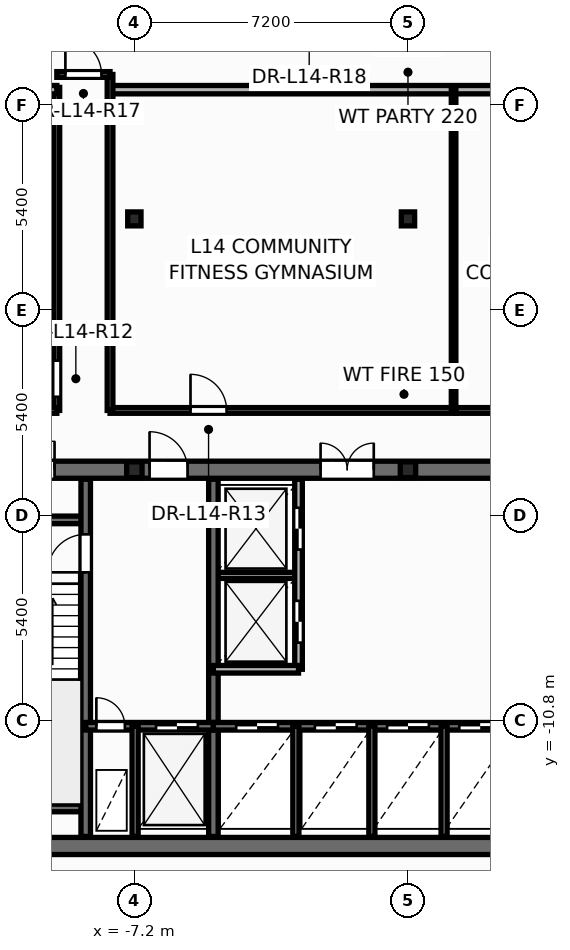
"""IFC4 building model, lengths in metres.
Left out: names, types, materials, properties, quantities, classifications, styles, units other than length and angle.
Written with IfcOpenShell. Run it as: python <this file> out.ifc"""

import sys

from ifc_helpers import new_model, si_unit, direction, frame, frame_2d, origin, origin_2d, place, context, subcontext, project, spatial, rectangle, i_section, extrude, element, fill, save


model = new_model("IFC4")
c1 = context("Model", 3, precision=1e-05, world=origin(), true_north=direction((0.0, 1.0)))
c2 = subcontext(c1, "Body", "Model", "MODEL_VIEW")
j1 = project(units=[si_unit("LENGTHUNIT", "METRE"), si_unit("PLANEANGLEUNIT", "RADIAN")], contexts=[c1])
p1 = place(None, origin())
s1 = spatial("IfcSite", under=j1, at=p1, CompositionType="ELEMENT")
p2 = place(p1, origin())
s2 = spatial("IfcBuilding", under=s1, at=p2, CompositionType="ELEMENT")
p3 = place(p2, frame((0.0, 0.0, 56.7)))
s3 = spatial("IfcBuildingStorey", under=s2, at=p3, CompositionType="ELEMENT", Elevation=56.7)
for number, where, z_axis, x_axis in (
    (1, (-7.2, -4.2, 0.0), (0.0, 0.0, 1.0), (1.0, 0.0, 0.0)),
    (2, (0.0, -4.2, 0.0), (0.0, 0.0, 1.0), (1.0, 0.0, 0.0)),
):
    element("IfcColumn", number, at=place(p3, frame(where, z_axis=z_axis, x_axis=x_axis)), inside=s3, PredefinedType="PILASTER", context=c2, shape_type="SweptSolid", body=[
        extrude(i_section(OverallWidth=0.405, OverallDepth=0.414, WebThickness=0.022, FlangeThickness=0.032, at=origin_2d()), origin(), (0.0, 0.0, 1.0), 3.6),
    ])
for number, where, z_axis, x_axis in (
    (3, (-7.2, 2.4, 0.0), (0.0, 0.0, 1.0), (1.0, 0.0, 0.0)),
    (4, (0.0, 2.4, 0.0), (0.0, 0.0, 1.0), (1.0, 0.0, 0.0)),
):
    element("IfcColumn", number, at=place(p3, frame(where, z_axis=z_axis, x_axis=x_axis)), inside=s3, PredefinedType="COLUMN", context=c2, shape_type="SweptSolid", body=[
        extrude(i_section(OverallWidth=0.35, OverallDepth=0.367, WebThickness=0.025, FlangeThickness=0.032, at=origin_2d()), origin(), (0.0, 0.0, 1.0), 3.6),
    ])
p4 = place(p3, frame((-5.12, -6.98, 0.0), z_axis=(0.0, 0.0, 1.0), x_axis=(1.0, 0.0, 0.0)))
e5 = element("IfcWall", 5, at=p4, inside=s3, PredefinedType="PARTITIONING", context=c2, shape_type="SweptSolid", body=[
    extrude(rectangle(XDim=2.24, YDim=0.16, at=frame_2d((1.12, 0.0))), origin(), (0.0, 0.0, 1.0), 3.32),
])
p5 = place(p3, frame((-12.65, -14.1, 0.0), z_axis=(0.0, 0.0, 1.0), x_axis=(1.0, 0.0, 0.0)))
e6 = element("IfcWall", 6, at=p5, inside=s3, PredefinedType="SHEAR", context=c2, shape_type="SweptSolid", body=[
    extrude(rectangle(XDim=25.3, YDim=0.45, at=frame_2d((12.65, 0.0))), origin(), (0.0, 0.0, 1.0), 3.6),
])
p6 = place(p3, frame((-12.65, -4.2, 0.0), z_axis=(0.0, 0.0, 1.0), x_axis=(1.0, 0.0, 0.0)))
e7 = element("IfcWall", 7, at=p6, inside=s3, PredefinedType="SHEAR", context=c2, shape_type="SweptSolid", body=[
    extrude(rectangle(XDim=25.3, YDim=0.45, at=frame_2d((12.65, 0.0))), origin(), (0.0, 0.0, 1.0), 3.6),
])
p7 = place(p6, frame((0.95, 0.0, 0.0)))
e8 = element("IfcOpeningElement", 8, at=p7, cuts=e7, PredefinedType="OPENING", context=c2, shape_type="SweptSolid", body=[
    extrude(rectangle(XDim=0.756, YDim=2.054, at=frame_2d((0.375, 1.027))), frame((0.0, 0.235, 0.0), z_axis=(0.0, -1.0, 0.0), x_axis=(1.0, 0.0, 0.0)), (0.0, 0.0, 1.0), 0.47),
])
p8 = place(p6, frame((2.6, 0.0, 0.0)))
e9 = element("IfcOpeningElement", 9, at=p8, cuts=e7, PredefinedType="OPENING", context=c2, shape_type="SweptSolid", body=[
    extrude(rectangle(XDim=0.756, YDim=2.054, at=frame_2d((0.375, 1.027))), frame((0.0, 0.235, 0.0), z_axis=(0.0, -1.0, 0.0), x_axis=(1.0, 0.0, 0.0)), (0.0, 0.0, 1.0), 0.47),
])
p9 = place(p6, frame((21.85, 0.0, 0.0)))
e10 = element("IfcOpeningElement", 10, at=p9, cuts=e7, PredefinedType="OPENING", context=c2, shape_type="SweptSolid", body=[
    extrude(rectangle(XDim=0.756, YDim=2.054, at=frame_2d((0.375, 1.027))), frame((0.0, 0.235, 0.0), z_axis=(0.0, -1.0, 0.0), x_axis=(1.0, 0.0, 0.0)), (0.0, 0.0, 1.0), 0.47),
])
p10 = place(p6, frame((23.5, 0.0, 0.0)))
e11 = element("IfcOpeningElement", 11, at=p10, cuts=e7, PredefinedType="OPENING", context=c2, shape_type="SweptSolid", body=[
    extrude(rectangle(XDim=0.756, YDim=2.054, at=frame_2d((0.375, 1.027))), frame((0.0, 0.235, 0.0), z_axis=(0.0, -1.0, 0.0), x_axis=(1.0, 0.0, 0.0)), (0.0, 0.0, 1.0), 0.47),
])
p11 = place(p6, frame((5.85, 0.0, 0.0)))
e12 = element("IfcOpeningElement", 12, at=p11, cuts=e7, PredefinedType="OPENING", context=c2, shape_type="SweptSolid", body=[
    extrude(rectangle(XDim=1.006, YDim=2.104, at=frame_2d((0.5, 1.052))), frame((0.0, 0.235, 0.0), z_axis=(0.0, -1.0, 0.0), x_axis=(1.0, 0.0, 0.0)), (0.0, 0.0, 1.0), 0.47),
])
p12 = place(p6, frame((10.35, 0.0, 0.0)))
e13 = element("IfcOpeningElement", 13, at=p12, cuts=e7, PredefinedType="OPENING", context=c2, shape_type="SweptSolid", body=[
    extrude(rectangle(XDim=1.406, YDim=2.154, at=frame_2d((0.7, 1.077))), frame((0.0, 0.235, 0.0), z_axis=(0.0, -1.0, 0.0), x_axis=(1.0, 0.0, 0.0)), (0.0, 0.0, 1.0), 0.47),
])
p13 = place(p6, frame((18.45, 0.0, 0.0)))
e14 = element("IfcOpeningElement", 14, at=p13, cuts=e7, PredefinedType="OPENING", context=c2, shape_type="SweptSolid", body=[
    extrude(rectangle(XDim=1.006, YDim=2.104, at=frame_2d((0.5, 1.052))), frame((0.0, 0.235, 0.0), z_axis=(0.0, -1.0, 0.0), x_axis=(1.0, 0.0, 0.0)), (0.0, 0.0, 1.0), 0.47),
])
for number, where, z_axis, x_axis in (
    (15, (-12.35, -5.52, 0.0), (0.0, 0.0, 1.0), (1.0, 0.0, 0.0)),
    (16, (-12.35, -13.1, 0.0), (0.0, 0.0, 1.0), (1.0, 0.0, 0.0)),
):
    element("IfcWall", number, at=place(p3, frame(where, z_axis=z_axis, x_axis=x_axis)), inside=s3, PredefinedType="SOLIDWALL", context=c2, shape_type="SweptSolid", body=[
        extrude(rectangle(XDim=3.87, YDim=0.2, at=frame_2d((1.935, 0.0))), origin(), (0.0, 0.0, 1.0), 3.6),
    ])
p14 = place(p3, frame((-8.48, -13.85, 0.0), z_axis=(0.0, 0.0, 1.0), x_axis=(0.0, 1.0, 0.0)))
e17 = element("IfcWall", 17, at=p14, inside=s3, PredefinedType="SHEAR", context=c2, shape_type="SweptSolid", body=[
    extrude(rectangle(XDim=9.4, YDim=0.25, at=frame_2d((4.7, 0.0))), origin(), (0.0, 0.0, 1.0), 3.6),
])
p15 = place(p14, frame((6.95, 0.0, 0.0)))
e18 = element("IfcOpeningElement", 18, at=p15, cuts=e17, PredefinedType="OPENING", context=c2, shape_type="SweptSolid", body=[
    extrude(rectangle(XDim=1.006, YDim=2.104, at=frame_2d((0.5, 1.052))), frame((0.0, 0.135, 0.0), z_axis=(0.0, -1.0, 0.0), x_axis=(1.0, 0.0, 0.0)), (0.0, 0.0, 1.0), 0.27),
])
p16 = place(p3, frame((-5.12, -13.85, 0.0), z_axis=(0.0, 0.0, 1.0), x_axis=(0.0, 1.0, 0.0)))
e19 = element("IfcWall", 19, at=p16, inside=s3, PredefinedType="SHEAR", context=c2, shape_type="SweptSolid", body=[
    extrude(rectangle(XDim=9.4, YDim=0.25, at=frame_2d((4.7, 0.0))), origin(), (0.0, 0.0, 1.0), 3.6),
])
p17 = place(p3, frame((-8.48, -10.95, 0.0), z_axis=(0.0, 0.0, 1.0), x_axis=(1.0, 0.0, 0.0)))
e20 = element("IfcWall", 20, at=p17, inside=s3, PredefinedType="SOLIDWALL", context=c2, shape_type="SweptSolid", body=[
    extrude(rectangle(XDim=3.36, YDim=0.2, at=frame_2d((1.68, 0.0))), origin(), (0.0, 0.0, 1.0), 3.6),
])
p18 = place(p17, frame((0.28, 0.0, 0.0)))
e21 = element("IfcOpeningElement", 21, at=p18, cuts=e20, PredefinedType="OPENING", context=c2, shape_type="SweptSolid", body=[
    extrude(rectangle(XDim=0.756, YDim=2.054, at=frame_2d((0.375, 1.027))), frame((0.0, 0.11, 0.0), z_axis=(0.0, -1.0, 0.0), x_axis=(1.0, 0.0, 0.0)), (0.0, 0.0, 1.0), 0.22),
])
p19 = place(p17, frame((1.85, 0.0, 0.0)))
e22 = element("IfcOpeningElement", 22, at=p19, cuts=e20, PredefinedType="OPENING", context=c2, shape_type="SweptSolid", body=[
    extrude(rectangle(XDim=1.106, YDim=2.104, at=frame_2d((0.55, 1.052))), frame((0.0, 0.11, 0.0), z_axis=(0.0, -1.0, 0.0), x_axis=(1.0, 0.0, 0.0)), (0.0, 0.0, 1.0), 0.22),
])
p20 = place(p3, frame((-5.12, -10.95, 0.0), z_axis=(0.0, 0.0, 1.0), x_axis=(1.0, 0.0, 0.0)))
e23 = element("IfcWall", 23, at=p20, inside=s3, PredefinedType="SOLIDWALL", context=c2, shape_type="SweptSolid", body=[
    extrude(rectangle(XDim=10.24, YDim=0.2, at=frame_2d((5.12, 0.0))), origin(), (0.0, 0.0, 1.0), 3.6),
])
p21 = place(p20, frame((0.6, 0.0, 0.0)))
e24 = element("IfcOpeningElement", 24, at=p21, cuts=e23, PredefinedType="OPENING", context=c2, shape_type="SweptSolid", body=[
    extrude(rectangle(XDim=1.106, YDim=2.104, at=frame_2d((0.55, 1.052))), frame((0.0, 0.11, 0.0), z_axis=(0.0, -1.0, 0.0), x_axis=(1.0, 0.0, 0.0)), (0.0, 0.0, 1.0), 0.22),
])
p22 = place(p20, frame((2.67, 0.0, 0.0)))
e25 = element("IfcOpeningElement", 25, at=p22, cuts=e23, PredefinedType="OPENING", context=c2, shape_type="SweptSolid", body=[
    extrude(rectangle(XDim=1.106, YDim=2.104, at=frame_2d((0.55, 1.052))), frame((0.0, 0.11, 0.0), z_axis=(0.0, -1.0, 0.0), x_axis=(1.0, 0.0, 0.0)), (0.0, 0.0, 1.0), 0.22),
])
p23 = place(p20, frame((4.57, 0.0, 0.0)))
e26 = element("IfcOpeningElement", 26, at=p23, cuts=e23, PredefinedType="OPENING", context=c2, shape_type="SweptSolid", body=[
    extrude(rectangle(XDim=1.106, YDim=2.104, at=frame_2d((0.55, 1.052))), frame((0.0, 0.11, 0.0), z_axis=(0.0, -1.0, 0.0), x_axis=(1.0, 0.0, 0.0)), (0.0, 0.0, 1.0), 0.22),
])
p24 = place(p20, frame((6.47, 0.0, 0.0)))
e27 = element("IfcOpeningElement", 27, at=p24, cuts=e23, PredefinedType="OPENING", context=c2, shape_type="SweptSolid", body=[
    extrude(rectangle(XDim=1.106, YDim=2.104, at=frame_2d((0.55, 1.052))), frame((0.0, 0.11, 0.0), z_axis=(0.0, -1.0, 0.0), x_axis=(1.0, 0.0, 0.0)), (0.0, 0.0, 1.0), 0.22),
])
p25 = place(p20, frame((8.54, 0.0, 0.0)))
e28 = element("IfcOpeningElement", 28, at=p25, cuts=e23, PredefinedType="OPENING", context=c2, shape_type="SweptSolid", body=[
    extrude(rectangle(XDim=1.106, YDim=2.104, at=frame_2d((0.55, 1.052))), frame((0.0, 0.11, 0.0), z_axis=(0.0, -1.0, 0.0), x_axis=(1.0, 0.0, 0.0)), (0.0, 0.0, 1.0), 0.22),
])
for number, where, z_axis, x_axis in (
    (29, (-7.18, -13.85, 0.0), (0.0, 0.0, 1.0), (0.0, 1.0, 0.0)),
    (30, (-2.95, -13.85, 0.0), (0.0, 0.0, 1.0), (0.0, 1.0, 0.0)),
):
    element("IfcWall", number, at=place(p3, frame(where, z_axis=z_axis, x_axis=x_axis)), inside=s3, PredefinedType="PARTITIONING", context=c2, shape_type="SweptSolid", body=[
        extrude(rectangle(XDim=2.9, YDim=0.16, at=frame_2d((1.45, 0.0))), origin(), (0.0, 0.0, 1.0), 2.345),
    ])
p26 = place(p3, frame((-2.88, -9.45, 0.0), z_axis=(0.0, 0.0, 1.0), x_axis=(0.0, 1.0, 0.0)))
e31 = element("IfcWall", 31, at=p26, inside=s3, PredefinedType="SOLIDWALL", context=c2, shape_type="SweptSolid", body=[
    extrude(rectangle(XDim=5.0, YDim=0.2, at=frame_2d((2.5, 0.0))), origin(), (0.0, 0.0, 1.0), 3.32),
])
p27 = place(p26, frame((0.7, 0.0, 0.0)))
e32 = element("IfcOpeningElement", 32, at=p27, cuts=e31, PredefinedType="OPENING", context=c2, shape_type="SweptSolid", body=[
    extrude(rectangle(XDim=1.106, YDim=2.104, at=frame_2d((0.55, 1.052))), frame((0.0, 0.11, 0.0), z_axis=(0.0, -1.0, 0.0), x_axis=(1.0, 0.0, 0.0)), (0.0, 0.0, 1.0), 0.22),
])
p28 = place(p26, frame((3.15, 0.0, 0.0)))
e33 = element("IfcOpeningElement", 33, at=p28, cuts=e31, PredefinedType="OPENING", context=c2, shape_type="SweptSolid", body=[
    extrude(rectangle(XDim=1.106, YDim=2.104, at=frame_2d((0.55, 1.052))), frame((0.0, 0.11, 0.0), z_axis=(0.0, -1.0, 0.0), x_axis=(1.0, 0.0, 0.0)), (0.0, 0.0, 1.0), 0.22),
])
p29 = place(p3, frame((-5.12, -9.45, 0.0), z_axis=(0.0, 0.0, 1.0), x_axis=(1.0, 0.0, 0.0)))
e34 = element("IfcWall", 34, at=p29, inside=s3, PredefinedType="SOLIDWALL", context=c2, shape_type="SweptSolid", body=[
    extrude(rectangle(XDim=2.24, YDim=0.2, at=frame_2d((1.12, 0.0))), origin(), (0.0, 0.0, 1.0), 3.32),
])
for number, where, z_axis, x_axis in (
    (35, (-0.95, -13.85, 0.0), (0.0, 0.0, 1.0), (0.0, 1.0, 0.0)),
    (36, (0.95, -13.85, 0.0), (0.0, 0.0, 1.0), (0.0, 1.0, 0.0)),
):
    element("IfcWall", number, at=place(p3, frame(where, z_axis=z_axis, x_axis=x_axis)), inside=s3, PredefinedType="PARTITIONING", context=c2, shape_type="SweptSolid", body=[
        extrude(rectangle(XDim=2.9, YDim=0.16, at=frame_2d((1.45, 0.0))), origin(), (0.0, 0.0, 1.0), 2.345),
    ])
p30 = place(p3, frame((-7.84, -2.64, 0.0), z_axis=(0.0, 0.0, 1.0), x_axis=(1.0, 0.0, 0.0)))
e37 = element("IfcWall", 37, at=p30, inside=s3, PredefinedType="PARTITIONING", context=c2, shape_type="SweptSolid", body=[
    extrude(rectangle(XDim=9.1, YDim=0.15, at=frame_2d((4.55, 0.0))), origin(), (0.0, 0.0, 1.0), 2.295),
])
p31 = place(p30, frame((2.117, 0.0, 0.0)))
e38 = element("IfcOpeningElement", 38, at=p31, cuts=e37, PredefinedType="OPENING", context=c2, shape_type="SweptSolid", body=[
    extrude(rectangle(XDim=0.956, YDim=2.104, at=frame_2d((0.475, 1.052))), frame((0.0, 0.085, 0.0), z_axis=(0.0, -1.0, 0.0), x_axis=(1.0, 0.0, 0.0)), (0.0, 0.0, 1.0), 0.17),
])
p32 = place(p3, frame((-7.84, 5.8, 0.0), z_axis=(0.0, 0.0, 1.0), x_axis=(1.0, 0.0, 0.0)))
e39 = element("IfcWall", 39, at=p32, inside=s3, PredefinedType="PARTITIONING", context=c2, shape_type="SweptSolid", body=[
    extrude(rectangle(XDim=15.68, YDim=0.22, at=frame_2d((7.84, 0.0))), origin(), (0.0, 0.0, 1.0), 2.295),
])
p33 = place(p3, frame((-9.24, -2.64, 0.0), z_axis=(0.0, 0.0, 1.0), x_axis=(0.0, 1.0, 0.0)))
e40 = element("IfcWall", 40, at=p33, inside=s3, PredefinedType="PARTITIONING", context=c2, shape_type="SweptSolid", body=[
    extrude(rectangle(XDim=8.5, YDim=0.15, at=frame_2d((4.25, 0.0))), origin(), (0.0, 0.0, 1.0), 2.479),
])
p34 = place(p33, frame((0.36, 0.0, 0.0)))
e41 = element("IfcOpeningElement", 41, at=p34, cuts=e40, PredefinedType="OPENING", context=c2, shape_type="SweptSolid", body=[
    extrude(rectangle(XDim=0.956, YDim=2.104, at=frame_2d((0.475, 1.052))), frame((0.0, 0.085, 0.0), z_axis=(0.0, -1.0, 0.0), x_axis=(1.0, 0.0, 0.0)), (0.0, 0.0, 1.0), 0.17),
])
p35 = place(p3, frame((-7.84, -2.64, 0.0), z_axis=(0.0, 0.0, 1.0), x_axis=(0.0, 1.0, 0.0)))
e42 = element("IfcWall", 42, at=p35, inside=s3, PredefinedType="PARTITIONING", context=c2, shape_type="SweptSolid", body=[
    extrude(rectangle(XDim=8.84, YDim=0.15, at=frame_2d((4.42, 0.0))), origin(), (0.0, 0.0, 1.0), 2.479),
])
p36 = place(p3, frame((1.2, -2.64, 0.0), z_axis=(0.0, 0.0, 1.0), x_axis=(0.0, 1.0, 0.0)))
e43 = element("IfcWall", 43, at=p36, inside=s3, PredefinedType="PARTITIONING", context=c2, shape_type="SweptSolid", body=[
    extrude(rectangle(XDim=8.44, YDim=0.12, at=frame_2d((4.22, 0.0))), origin(), (0.0, 0.0, 1.0), 2.295),
])
p37 = place(p3, frame((1.262, -2.64, 0.0), z_axis=(0.0, 0.0, 1.0), x_axis=(1.0, 0.0, 0.0)))
e44 = element("IfcWall", 44, at=p37, inside=s3, PredefinedType="PARTITIONING", context=c2, shape_type="SweptSolid", body=[
    extrude(rectangle(XDim=6.578, YDim=0.15, at=frame_2d((3.289, 0.0))), origin(), (0.0, 0.0, 1.0), 2.295),
])
p38 = place(p3, frame((-12.5, -2.64, 0.0), z_axis=(0.0, 0.0, 1.0), x_axis=(1.0, 0.0, 0.0)))
e45 = element("IfcWall", 45, at=p38, inside=s3, PredefinedType="PARTITIONING", context=c2, shape_type="SweptSolid", body=[
    extrude(rectangle(XDim=3.26, YDim=0.15, at=frame_2d((1.63, 0.0))), origin(), (0.0, 0.0, 1.0), 3.32),
])
p39 = place(p3, frame((-12.781, 5.8, 0.0), z_axis=(0.0, 0.0, 1.0), x_axis=(1.0, 0.0, 0.0)))
e46 = element("IfcWall", 46, at=p39, inside=s3, PredefinedType="PARTITIONING", context=c2, shape_type="SweptSolid", body=[
    extrude(rectangle(XDim=3.542, YDim=0.22, at=frame_2d((1.771, 0.0))), origin(), (0.0, 0.0, 1.0), 2.479),
])
p40 = place(p3, frame((-9.24, 6.2, 0.0), z_axis=(0.0, 0.0, 1.0), x_axis=(1.0, 0.0, 0.0)))
e47 = element("IfcWall", 47, at=p40, inside=s3, PredefinedType="PARTITIONING", context=c2, shape_type="SweptSolid", body=[
    extrude(rectangle(XDim=1.4, YDim=0.15, at=frame_2d((0.7, 0.0))), origin(), (0.0, 0.0, 1.0), 3.32),
])
p41 = place(p40, frame((0.225, 0.0, 0.0)))
e48 = element("IfcOpeningElement", 48, at=p41, cuts=e47, PredefinedType="OPENING", context=c2, shape_type="SweptSolid", body=[
    extrude(rectangle(XDim=0.956, YDim=2.104, at=frame_2d((0.475, 1.052))), frame((0.0, 0.085, 0.0), z_axis=(0.0, -1.0, 0.0), x_axis=(1.0, 0.0, 0.0)), (0.0, 0.0, 1.0), 0.17),
])
p42 = place(p27, origin())
e49 = element("IfcDoor", 49, at=p42, inside=s3, OperationType="DOUBLE_DOOR_SLIDING", PredefinedType="DOOR", context=c2, shape_type="SweptSolid", body=[
    extrude(rectangle(XDim=1.1, YDim=2.1, at=frame_2d((0.55, 1.05))), frame((0.0, 0.025, 0.0), z_axis=(0.0, -1.0, 0.0), x_axis=(1.0, 0.0, 0.0)), (0.0, 0.0, 1.0), 0.05),
])
fill(e32, e49)
p43 = place(p28, origin())
e50 = element("IfcDoor", 50, at=p43, inside=s3, OperationType="DOUBLE_DOOR_SLIDING", PredefinedType="DOOR", context=c2, shape_type="SweptSolid", body=[
    extrude(rectangle(XDim=1.1, YDim=2.1, at=frame_2d((0.55, 1.05))), frame((0.0, 0.025, 0.0), z_axis=(0.0, -1.0, 0.0), x_axis=(1.0, 0.0, 0.0)), (0.0, 0.0, 1.0), 0.05),
])
fill(e33, e50)
p44 = place(p15, origin())
e51 = element("IfcDoor", 51, at=p44, inside=s3, OperationType="SINGLE_SWING_LEFT", PredefinedType="DOOR", context=c2, shape_type="SweptSolid", body=[
    extrude(rectangle(XDim=1.0, YDim=2.1, at=frame_2d((0.5, 1.05))), frame((0.0, 0.025, 0.0), z_axis=(0.0, -1.0, 0.0), x_axis=(1.0, 0.0, 0.0)), (0.0, 0.0, 1.0), 0.05),
])
fill(e18, e51)
p45 = place(p18, origin())
e52 = element("IfcDoor", 52, at=p45, inside=s3, OperationType="SINGLE_SWING_LEFT", PredefinedType="DOOR", context=c2, shape_type="SweptSolid", body=[
    extrude(rectangle(XDim=0.75, YDim=2.05, at=frame_2d((0.375, 1.025))), frame((0.0, 0.025, 0.0), z_axis=(0.0, -1.0, 0.0), x_axis=(1.0, 0.0, 0.0)), (0.0, 0.0, 1.0), 0.05),
])
fill(e21, e52)
p46 = place(p19, origin())
e53 = element("IfcDoor", 53, at=p46, inside=s3, OperationType="DOUBLE_DOOR_SLIDING", PredefinedType="DOOR", context=c2, shape_type="SweptSolid", body=[
    extrude(rectangle(XDim=1.1, YDim=2.1, at=frame_2d((0.55, 1.05))), frame((0.0, 0.025, 0.0), z_axis=(0.0, -1.0, 0.0), x_axis=(1.0, 0.0, 0.0)), (0.0, 0.0, 1.0), 0.05),
])
fill(e22, e53)
p47 = place(p21, origin())
e54 = element("IfcDoor", 54, at=p47, inside=s3, OperationType="DOUBLE_DOOR_SLIDING", PredefinedType="DOOR", context=c2, shape_type="SweptSolid", body=[
    extrude(rectangle(XDim=1.1, YDim=2.1, at=frame_2d((0.55, 1.05))), frame((0.0, 0.025, 0.0), z_axis=(0.0, -1.0, 0.0), x_axis=(1.0, 0.0, 0.0)), (0.0, 0.0, 1.0), 0.05),
])
fill(e24, e54)
p48 = place(p22, origin())
e55 = element("IfcDoor", 55, at=p48, inside=s3, OperationType="DOUBLE_DOOR_SLIDING", PredefinedType="DOOR", context=c2, shape_type="SweptSolid", body=[
    extrude(rectangle(XDim=1.1, YDim=2.1, at=frame_2d((0.55, 1.05))), frame((0.0, 0.025, 0.0), z_axis=(0.0, -1.0, 0.0), x_axis=(1.0, 0.0, 0.0)), (0.0, 0.0, 1.0), 0.05),
])
fill(e25, e55)
p49 = place(p23, origin())
e56 = element("IfcDoor", 56, at=p49, inside=s3, OperationType="DOUBLE_DOOR_SLIDING", PredefinedType="DOOR", context=c2, shape_type="SweptSolid", body=[
    extrude(rectangle(XDim=1.1, YDim=2.1, at=frame_2d((0.55, 1.05))), frame((0.0, 0.025, 0.0), z_axis=(0.0, -1.0, 0.0), x_axis=(1.0, 0.0, 0.0)), (0.0, 0.0, 1.0), 0.05),
])
fill(e26, e56)
p50 = place(p24, origin())
e57 = element("IfcDoor", 57, at=p50, inside=s3, OperationType="DOUBLE_DOOR_SLIDING", PredefinedType="DOOR", context=c2, shape_type="SweptSolid", body=[
    extrude(rectangle(XDim=1.1, YDim=2.1, at=frame_2d((0.55, 1.05))), frame((0.0, 0.025, 0.0), z_axis=(0.0, -1.0, 0.0), x_axis=(1.0, 0.0, 0.0)), (0.0, 0.0, 1.0), 0.05),
])
fill(e27, e57)
p51 = place(p8, origin())
e58 = element("IfcDoor", 58, at=p51, inside=s3, OperationType="SINGLE_SWING_RIGHT", PredefinedType="DOOR", context=c2, shape_type="SweptSolid", body=[
    extrude(rectangle(XDim=0.75, YDim=2.05, at=frame_2d((0.375, 1.025))), frame((0.0, 0.025, 0.0), z_axis=(0.0, -1.0, 0.0), x_axis=(1.0, 0.0, 0.0)), (0.0, 0.0, 1.0), 0.05),
])
fill(e9, e58)
p52 = place(p11, origin())
e59 = element("IfcDoor", 59, at=p52, inside=s3, OperationType="SINGLE_SWING_LEFT", PredefinedType="DOOR", context=c2, shape_type="SweptSolid", body=[
    extrude(rectangle(XDim=1.0, YDim=2.1, at=frame_2d((0.5, 1.05))), frame((0.0, 0.025, 0.0), z_axis=(0.0, -1.0, 0.0), x_axis=(1.0, 0.0, 0.0)), (0.0, 0.0, 1.0), 0.05),
])
fill(e12, e59)
p53 = place(p12, origin())
e60 = element("IfcDoor", 60, at=p53, inside=s3, OperationType="DOUBLE_DOOR_SINGLE_SWING", PredefinedType="DOOR", context=c2, shape_type="SweptSolid", body=[
    extrude(rectangle(XDim=1.4, YDim=2.15, at=frame_2d((0.7, 1.075))), frame((0.0, 0.025, 0.0), z_axis=(0.0, -1.0, 0.0), x_axis=(1.0, 0.0, 0.0)), (0.0, 0.0, 1.0), 0.05),
])
fill(e13, e60)
p54 = place(p34, origin())
e61 = element("IfcDoor", 61, at=p54, inside=s3, OperationType="SINGLE_SWING_RIGHT", PredefinedType="DOOR", context=c2, shape_type="SweptSolid", body=[
    extrude(rectangle(XDim=0.95, YDim=2.1, at=frame_2d((0.475, 1.05))), frame((0.0, 0.025, 0.0), z_axis=(0.0, -1.0, 0.0), x_axis=(1.0, 0.0, 0.0)), (0.0, 0.0, 1.0), 0.05),
])
fill(e41, e61)
p55 = place(p31, origin())
e62 = element("IfcDoor", 62, at=p55, inside=s3, OperationType="SINGLE_SWING_LEFT", PredefinedType="DOOR", context=c2, shape_type="SweptSolid", body=[
    extrude(rectangle(XDim=0.95, YDim=2.1, at=frame_2d((0.475, 1.05))), frame((0.0, 0.025, 0.0), z_axis=(0.0, -1.0, 0.0), x_axis=(1.0, 0.0, 0.0)), (0.0, 0.0, 1.0), 0.05),
])
fill(e38, e62)
p56 = place(p41, origin())
e63 = element("IfcDoor", 63, at=p56, inside=s3, OperationType="SINGLE_SWING_LEFT", PredefinedType="DOOR", context=c2, shape_type="SweptSolid", body=[
    extrude(rectangle(XDim=0.95, YDim=2.1, at=frame_2d((0.475, 1.05))), frame((0.0, 0.025, 0.0), z_axis=(0.0, -1.0, 0.0), x_axis=(1.0, 0.0, 0.0)), (0.0, 0.0, 1.0), 0.05),
])
fill(e48, e63)
save(model, sys.argv[1])
